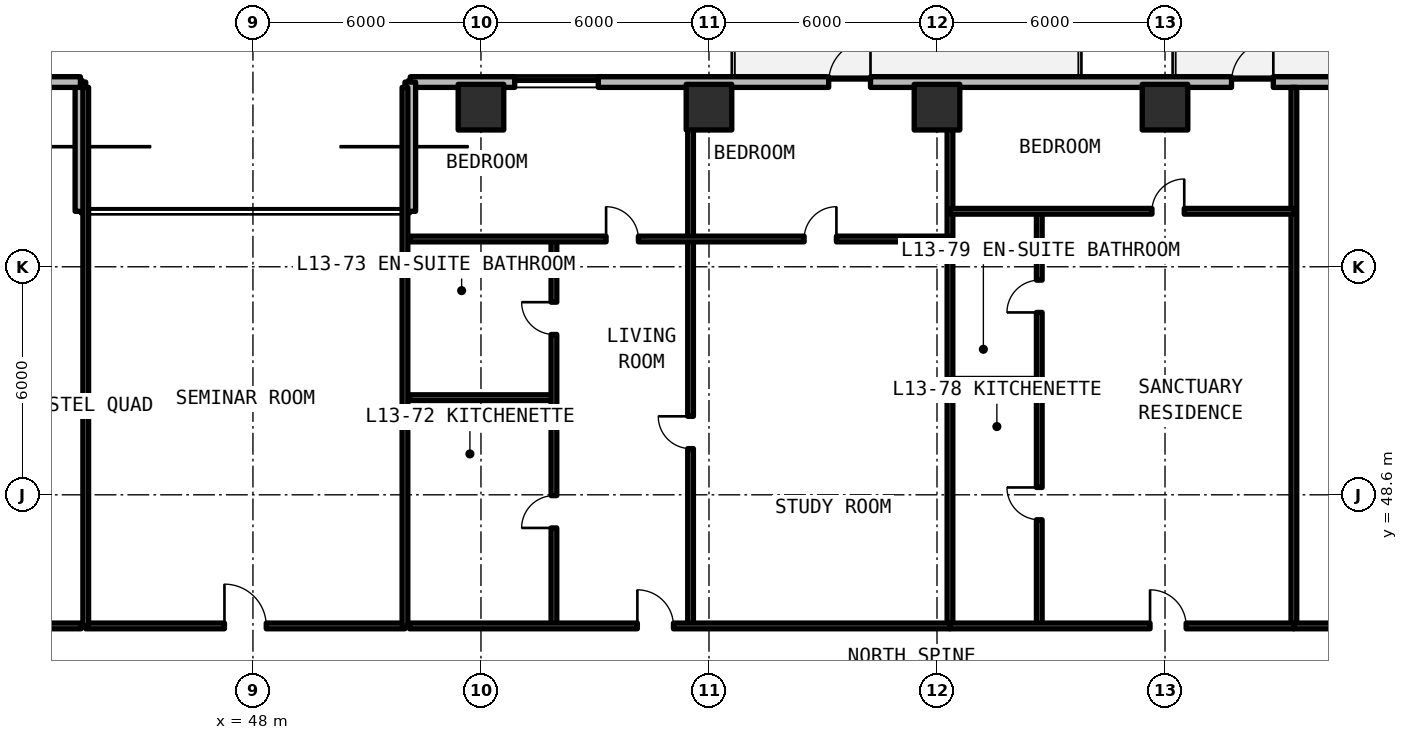
"""IFC4 building model, lengths in metres.
Left out: names, types, materials, properties, quantities, classifications, styles, units other than length and angle.
Written with IfcOpenShell. Run it as: python <this file> out.ifc"""

import sys

from ifc_helpers import new_model, si_unit, direction, frame, frame_2d, origin, origin_2d, place, context, subcontext, project, spatial, rectangle, extrude, element, fill, save


model = new_model("IFC4")
c1 = context("Model", 3, precision=1e-05, world=origin(), true_north=direction((0.0, 1.0)))
c2 = subcontext(c1, "Body", "Model", "MODEL_VIEW")
j1 = project(units=[si_unit("LENGTHUNIT", "METRE"), si_unit("PLANEANGLEUNIT", "RADIAN")], contexts=[c1])
p1 = place(None, origin())
s1 = spatial("IfcSite", under=j1, at=p1, CompositionType="ELEMENT")
p2 = place(p1, origin())
s2 = spatial("IfcBuilding", under=s1, at=p2, CompositionType="ELEMENT")
p3 = place(p2, frame((0.0, 0.0, 48.84)))
s3 = spatial("IfcBuildingStorey", under=s2, at=p3, CompositionType="ELEMENT", Elevation=48.84)
for number, where, z_axis, x_axis in (
    (1, (54.0, 58.8, 0.0), (0.0, 0.0, 1.0), (1.0, 0.0, 0.0)),
    (2, (60.0, 58.8, 0.0), (0.0, 0.0, 1.0), (1.0, 0.0, 0.0)),
    (3, (66.0, 58.8, 0.0), (0.0, 0.0, 1.0), (1.0, 0.0, 0.0)),
    (4, (72.0, 58.8, 0.0), (0.0, 0.0, 1.0), (1.0, 0.0, 0.0)),
):
    element("IfcColumn", number, at=place(p3, frame(where, z_axis=z_axis, x_axis=x_axis)), inside=s3, PredefinedType="COLUMN", context=c2, shape_type="SweptSolid", body=[
        extrude(rectangle(XDim=1.2, YDim=1.2, at=origin_2d()), origin(), (0.0, 0.0, 1.0), 3.3),
    ])
p4 = place(p3, frame((96.542, 59.46, 0.0), z_axis=(0.0, 0.0, 1.0), x_axis=(-1.0, 0.0, 0.0)))
e5 = element("IfcWall", 5, at=p4, inside=s3, PredefinedType="SOLIDWALL", context=c2, shape_type="SweptSolid", body=[
    extrude(rectangle(XDim=44.402, YDim=0.28, at=frame_2d((22.201, 0.0))), origin(), (0.0, 0.0, 1.0), 3.08),
])
p5 = place(p4, frame((32.292, 0.0, 0.0)))
e6 = element("IfcOpeningElement", 6, at=p5, cuts=e5, PredefinedType="OPENING", context=c2, shape_type="SweptSolid", body=[
    extrude(rectangle(XDim=1.1, YDim=2.15, at=frame_2d((0.55, 1.075))), frame((0.0, 0.15, 0.0), z_axis=(0.0, -1.0, 0.0), x_axis=(1.0, 0.0, 0.0)), (0.0, 0.0, 1.0), 0.3),
])
p6 = place(p4, frame((21.692, 0.0, 0.0)))
e7 = element("IfcOpeningElement", 7, at=p6, cuts=e5, PredefinedType="OPENING", context=c2, shape_type="SweptSolid", body=[
    extrude(rectangle(XDim=1.1, YDim=2.15, at=frame_2d((0.55, 1.075))), frame((0.0, 0.15, 0.0), z_axis=(0.0, -1.0, 0.0), x_axis=(1.0, 0.0, 0.0)), (0.0, 0.0, 1.0), 0.3),
])
p7 = place(p4, frame((9.792, 0.0, 0.0)))
e8 = element("IfcOpeningElement", 8, at=p7, cuts=e5, PredefinedType="OPENING", context=c2, shape_type="SweptSolid", body=[
    extrude(rectangle(XDim=1.1, YDim=2.15, at=frame_2d((0.55, 1.075))), frame((0.0, 0.15, 0.0), z_axis=(0.0, -1.0, 0.0), x_axis=(1.0, 0.0, 0.0)), (0.0, 0.0, 1.0), 0.3),
])
p8 = place(p4, frame((39.455, 0.0, 0.78)))
e9 = element("IfcOpeningElement", 9, at=p8, cuts=e5, PredefinedType="OPENING", context=c2, shape_type="SweptSolid", body=[
    extrude(rectangle(XDim=2.2, YDim=1.66, at=frame_2d((1.1, 0.83))), frame((0.0, 0.15, 0.0), z_axis=(0.0, -1.0, 0.0), x_axis=(1.0, 0.0, 0.0)), (0.0, 0.0, 1.0), 0.3),
])
p9 = place(p4, frame((7.432, 0.0, 0.78)))
e10 = element("IfcOpeningElement", 10, at=p9, cuts=e5, PredefinedType="OPENING", context=c2, shape_type="SweptSolid", body=[
    extrude(rectangle(XDim=0.85, YDim=1.65, at=frame_2d((0.425, 0.825))), frame((0.0, 0.15, 0.0), z_axis=(0.0, -1.0, 0.0), x_axis=(1.0, 0.0, 0.0)), (0.0, 0.0, 1.0), 0.3),
])
p10 = place(p4, frame((1.292, 0.0, 0.78)))
e11 = element("IfcOpeningElement", 11, at=p10, cuts=e5, PredefinedType="OPENING", context=c2, shape_type="SweptSolid", body=[
    extrude(rectangle(XDim=2.2, YDim=1.66, at=frame_2d((1.1, 0.83))), frame((0.0, 0.15, 0.0), z_axis=(0.0, -1.0, 0.0), x_axis=(1.0, 0.0, 0.0)), (0.0, 0.0, 1.0), 0.3),
])
for number, where, z_axis, x_axis in (
    (12, (52.14, 59.46, 0.0), (0.0, 0.0, 1.0), (0.0, -1.0, 0.0)),
    (13, (43.46, 56.06, 0.0), (0.0, 0.0, 1.0), (0.0, 1.0, 0.0)),
):
    element("IfcWall", number, at=place(p3, frame(where, z_axis=z_axis, x_axis=x_axis)), inside=s3, PredefinedType="SOLIDWALL", context=c2, shape_type="SweptSolid", body=[
        extrude(rectangle(XDim=3.4, YDim=0.28, at=frame_2d((1.7, 0.0))), origin(), (0.0, 0.0, 1.0), 3.08),
    ])
p11 = place(p3, frame((43.46, 59.46, 0.0), z_axis=(0.0, 0.0, 1.0), x_axis=(-1.0, 0.0, 0.0)))
e14 = element("IfcWall", 14, at=p11, inside=s3, PredefinedType="SOLIDWALL", context=c2, shape_type="SweptSolid", body=[
    extrude(rectangle(XDim=22.602, YDim=0.28, at=frame_2d((11.301, 0.0))), origin(), (0.0, 0.0, 1.0), 3.08),
])
p12 = place(p11, frame((15.26, 0.0, 0.0)))
e15 = element("IfcOpeningElement", 15, at=p12, cuts=e14, PredefinedType="OPENING", context=c2, shape_type="SweptSolid", body=[
    extrude(rectangle(XDim=1.1, YDim=2.15, at=frame_2d((0.55, 1.075))), frame((0.0, 0.15, 0.0), z_axis=(0.0, -1.0, 0.0), x_axis=(1.0, 0.0, 0.0)), (0.0, 0.0, 1.0), 0.3),
])
p13 = place(p11, frame((20.321, 0.0, 0.78)))
e16 = element("IfcOpeningElement", 16, at=p13, cuts=e14, PredefinedType="OPENING", context=c2, shape_type="SweptSolid", body=[
    extrude(rectangle(XDim=1.4, YDim=1.65, at=frame_2d((0.7, 0.825))), frame((0.0, 0.15, 0.0), z_axis=(0.0, -1.0, 0.0), x_axis=(1.0, 0.0, 0.0)), (0.0, 0.0, 1.0), 0.3),
])
p14 = place(p11, frame((5.793, 0.0, 0.78)))
e17 = element("IfcOpeningElement", 17, at=p14, cuts=e14, PredefinedType="OPENING", context=c2, shape_type="SweptSolid", body=[
    extrude(rectangle(XDim=0.85, YDim=1.65, at=frame_2d((0.425, 0.825))), frame((0.0, 0.15, 0.0), z_axis=(0.0, -1.0, 0.0), x_axis=(1.0, 0.0, 0.0)), (0.0, 0.0, 1.0), 0.3),
])
p15 = place(p11, frame((3.733, 0.0, 0.78)))
e18 = element("IfcOpeningElement", 18, at=p15, cuts=e14, PredefinedType="OPENING", context=c2, shape_type="SweptSolid", body=[
    extrude(rectangle(XDim=0.85, YDim=1.65, at=frame_2d((0.425, 0.825))), frame((0.0, 0.15, 0.0), z_axis=(0.0, -1.0, 0.0), x_axis=(1.0, 0.0, 0.0)), (0.0, 0.0, 1.0), 0.3),
])
p16 = place(p11, frame((2.065, 0.0, 0.78)))
e19 = element("IfcOpeningElement", 19, at=p16, cuts=e14, PredefinedType="OPENING", context=c2, shape_type="SweptSolid", body=[
    extrude(rectangle(XDim=0.85, YDim=1.65, at=frame_2d((0.425, 0.825))), frame((0.0, 0.15, 0.0), z_axis=(0.0, -1.0, 0.0), x_axis=(1.0, 0.0, 0.0)), (0.0, 0.0, 1.0), 0.3),
])
p17 = place(p3, frame((43.6, 45.15, 0.0), z_axis=(0.0, 0.0, 1.0), x_axis=(1.0, 0.0, 0.0)))
e20 = element("IfcWall", 20, at=p17, inside=s3, PredefinedType="SOLIDWALL", context=c2, shape_type="SweptSolid", body=[
    extrude(rectangle(XDim=8.4, YDim=0.15, at=frame_2d((4.2, 0.0))), origin(), (0.0, 0.0, 1.0), 2.35),
])
p18 = place(p17, frame((3.65, 0.0, 0.0)))
e21 = element("IfcOpeningElement", 21, at=p18, cuts=e20, PredefinedType="OPENING", context=c2, shape_type="SweptSolid", body=[
    extrude(rectangle(XDim=1.1, YDim=2.15, at=frame_2d((0.55, 1.075))), frame((0.0, 0.085, 0.0), z_axis=(0.0, -1.0, 0.0), x_axis=(1.0, 0.0, 0.0)), (0.0, 0.0, 1.0), 0.17),
])
for number, where, z_axis, x_axis in (
    (22, (43.6, 45.15, 0.0), (0.0, 0.0, 1.0), (0.0, 1.0, 0.0)),
    (23, (52.0, 45.15, 0.0), (0.0, 0.0, 1.0), (0.0, 1.0, 0.0)),
):
    element("IfcWall", number, at=place(p3, frame(where, z_axis=z_axis, x_axis=x_axis)), inside=s3, PredefinedType="SOLIDWALL", context=c2, shape_type="SweptSolid", body=[
        extrude(rectangle(XDim=14.17, YDim=0.15, at=frame_2d((7.085, 0.0))), origin(), (0.0, 0.0, 1.0), 2.35),
    ])
p19 = place(p3, frame((38.504, 45.15, 0.0), z_axis=(0.0, 0.0, 1.0), x_axis=(1.0, 0.0, 0.0)))
e24 = element("IfcWall", 24, at=p19, inside=s3, PredefinedType="SOLIDWALL", context=c2, shape_type="SweptSolid", body=[
    extrude(rectangle(XDim=4.976, YDim=0.15, at=frame_2d((2.488, 0.0))), origin(), (0.0, 0.0, 1.0), 2.35),
])
p20 = place(p19, frame((2.841, 0.0, 0.0)))
e25 = element("IfcOpeningElement", 25, at=p20, cuts=e24, PredefinedType="OPENING", context=c2, shape_type="SweptSolid", body=[
    extrude(rectangle(XDim=0.95, YDim=2.15, at=frame_2d((0.475, 1.075))), frame((0.0, 0.085, 0.0), z_axis=(0.0, -1.0, 0.0), x_axis=(1.0, 0.0, 0.0)), (0.0, 0.0, 1.0), 0.17),
])
p21 = place(p3, frame((66.341, 45.15, 0.0), z_axis=(0.0, 0.0, 1.0), x_axis=(0.0, 1.0, 0.0)))
e26 = element("IfcWall", 26, at=p21, inside=s3, PredefinedType="SOLIDWALL", context=c2, shape_type="SweptSolid", body=[
    extrude(rectangle(XDim=14.17, YDim=0.15, at=frame_2d((7.085, 0.0))), origin(), (0.0, 0.0, 1.0), 2.35),
])
p22 = place(p3, frame((59.515, 45.15, 0.0), z_axis=(0.0, 0.0, 1.0), x_axis=(0.0, 1.0, 0.0)))
e27 = element("IfcWall", 27, at=p22, inside=s3, PredefinedType="PARTITIONING", context=c2, shape_type="SweptSolid", body=[
    extrude(rectangle(XDim=10.181, YDim=0.15, at=frame_2d((5.09, 0.0))), origin(), (0.0, 0.0, 1.0), 2.35),
])
p23 = place(p22, frame((4.666, 0.0, 0.0)))
e28 = element("IfcOpeningElement", 28, at=p23, cuts=e27, PredefinedType="OPENING", context=c2, shape_type="SweptSolid", body=[
    extrude(rectangle(XDim=0.85, YDim=2.1, at=frame_2d((0.425, 1.05))), frame((0.0, 0.085, 0.0), z_axis=(0.0, -1.0, 0.0), x_axis=(1.0, 0.0, 0.0)), (0.0, 0.0, 1.0), 0.17),
])
p24 = place(p3, frame((52.12, 51.157, 0.0), z_axis=(0.0, 0.0, 1.0), x_axis=(1.0, 0.0, 0.0)))
e29 = element("IfcWall", 29, at=p24, inside=s3, PredefinedType="PARTITIONING", context=c2, shape_type="SweptSolid", body=[
    extrude(rectangle(XDim=3.8, YDim=0.15, at=frame_2d((1.9, 0.0))), origin(), (0.0, 0.0, 1.0), 2.35),
])
p25 = place(p3, frame((55.92, 45.15, 0.0), z_axis=(0.0, 0.0, 1.0), x_axis=(0.0, 1.0, 0.0)))
e30 = element("IfcWall", 30, at=p25, inside=s3, PredefinedType="PARTITIONING", context=c2, shape_type="SweptSolid", body=[
    extrude(rectangle(XDim=10.181, YDim=0.15, at=frame_2d((5.09, 0.0))), origin(), (0.0, 0.0, 1.0), 2.35),
])
p26 = place(p25, frame((2.578, 0.0, 0.0)))
e31 = element("IfcOpeningElement", 31, at=p26, cuts=e30, PredefinedType="OPENING", context=c2, shape_type="SweptSolid", body=[
    extrude(rectangle(XDim=0.85, YDim=2.1, at=frame_2d((0.425, 1.05))), frame((0.0, 0.085, 0.0), z_axis=(0.0, -1.0, 0.0), x_axis=(1.0, 0.0, 0.0)), (0.0, 0.0, 1.0), 0.17),
])
p27 = place(p25, frame((7.669, 0.0, 0.0)))
e32 = element("IfcOpeningElement", 32, at=p27, cuts=e30, PredefinedType="OPENING", context=c2, shape_type="SweptSolid", body=[
    extrude(rectangle(XDim=0.85, YDim=2.1, at=frame_2d((0.425, 1.05))), frame((0.0, 0.085, 0.0), z_axis=(0.0, -1.0, 0.0), x_axis=(1.0, 0.0, 0.0)), (0.0, 0.0, 1.0), 0.17),
])
p28 = place(p3, frame((59.515, 55.331, 0.0), z_axis=(0.0, 0.0, 1.0), x_axis=(0.0, 1.0, 0.0)))
e33 = element("IfcWall", 33, at=p28, inside=s3, PredefinedType="PARTITIONING", context=c2, shape_type="SweptSolid", body=[
    extrude(rectangle(XDim=3.989, YDim=0.15, at=frame_2d((1.995, 0.0))), origin(), (0.0, 0.0, 1.0), 2.35),
])
p29 = place(p3, frame((52.12, 55.331, 0.0), z_axis=(0.0, 0.0, 1.0), x_axis=(1.0, 0.0, 0.0)))
e34 = element("IfcWall", 34, at=p29, inside=s3, PredefinedType="PARTITIONING", context=c2, shape_type="SweptSolid", body=[
    extrude(rectangle(XDim=14.221, YDim=0.15, at=frame_2d((7.111, 0.0))), origin(), (0.0, 0.0, 1.0), 2.35),
])
p30 = place(p29, frame((5.173, 0.0, 0.0)))
e35 = element("IfcOpeningElement", 35, at=p30, cuts=e34, PredefinedType="OPENING", context=c2, shape_type="SweptSolid", body=[
    extrude(rectangle(XDim=0.85, YDim=2.1, at=frame_2d((0.425, 1.05))), frame((0.0, 0.085, 0.0), z_axis=(0.0, -1.0, 0.0), x_axis=(1.0, 0.0, 0.0)), (0.0, 0.0, 1.0), 0.17),
])
p31 = place(p29, frame((10.383, 0.0, 0.0)))
e36 = element("IfcOpeningElement", 36, at=p31, cuts=e34, PredefinedType="OPENING", context=c2, shape_type="SweptSolid", body=[
    extrude(rectangle(XDim=0.85, YDim=2.1, at=frame_2d((0.425, 1.05))), frame((0.0, 0.085, 0.0), z_axis=(0.0, -1.0, 0.0), x_axis=(1.0, 0.0, 0.0)), (0.0, 0.0, 1.0), 0.17),
])
p32 = place(p3, frame((52.12, 45.15, 0.0), z_axis=(0.0, 0.0, 1.0), x_axis=(1.0, 0.0, 0.0)))
e37 = element("IfcWall", 37, at=p32, inside=s3, PredefinedType="SOLIDWALL", context=c2, shape_type="SweptSolid", body=[
    extrude(rectangle(XDim=14.221, YDim=0.15, at=frame_2d((7.111, 0.0))), origin(), (0.0, 0.0, 1.0), 2.35),
])
p33 = place(p32, frame((5.995, 0.0, 0.0)))
e38 = element("IfcOpeningElement", 38, at=p33, cuts=e37, PredefinedType="OPENING", context=c2, shape_type="SweptSolid", body=[
    extrude(rectangle(XDim=0.95, YDim=2.15, at=frame_2d((0.475, 1.075))), frame((0.0, 0.085, 0.0), z_axis=(0.0, -1.0, 0.0), x_axis=(1.0, 0.0, 0.0)), (0.0, 0.0, 1.0), 0.17),
])
p34 = place(p3, frame((75.391, 45.15, 0.0), z_axis=(0.0, 0.0, 1.0), x_axis=(0.0, 1.0, 0.0)))
e39 = element("IfcWall", 39, at=p34, inside=s3, PredefinedType="SOLIDWALL", context=c2, shape_type="SweptSolid", body=[
    extrude(rectangle(XDim=14.17, YDim=0.15, at=frame_2d((7.085, 0.0))), origin(), (0.0, 0.0, 1.0), 2.35),
])
p35 = place(p3, frame((66.341, 51.587, 0.0), z_axis=(0.0, 0.0, 1.0), x_axis=(1.0, 0.0, 0.0)))
e40 = element("IfcWall", 40, at=p35, inside=s3, PredefinedType="PARTITIONING", context=c2, shape_type="SweptSolid", body=[
    extrude(rectangle(XDim=2.35, YDim=0.15, at=frame_2d((1.175, 0.0))), origin(), (0.0, 0.0, 1.0), 2.35),
])
p36 = place(p3, frame((68.691, 45.15, 0.0), z_axis=(0.0, 0.0, 1.0), x_axis=(0.0, 1.0, 0.0)))
e41 = element("IfcWall", 41, at=p36, inside=s3, PredefinedType="PARTITIONING", context=c2, shape_type="SweptSolid", body=[
    extrude(rectangle(XDim=10.91, YDim=0.15, at=frame_2d((5.455, 0.0))), origin(), (0.0, 0.0, 1.0), 2.35),
])
p37 = place(p36, frame((2.794, 0.0, 0.0)))
e42 = element("IfcOpeningElement", 42, at=p37, cuts=e41, PredefinedType="OPENING", context=c2, shape_type="SweptSolid", body=[
    extrude(rectangle(XDim=0.85, YDim=2.1, at=frame_2d((0.425, 1.05))), frame((0.0, 0.085, 0.0), z_axis=(0.0, -1.0, 0.0), x_axis=(1.0, 0.0, 0.0)), (0.0, 0.0, 1.0), 0.17),
])
p38 = place(p36, frame((8.249, 0.0, 0.0)))
e43 = element("IfcOpeningElement", 43, at=p38, cuts=e41, PredefinedType="OPENING", context=c2, shape_type="SweptSolid", body=[
    extrude(rectangle(XDim=0.85, YDim=2.1, at=frame_2d((0.425, 1.05))), frame((0.0, 0.085, 0.0), z_axis=(0.0, -1.0, 0.0), x_axis=(1.0, 0.0, 0.0)), (0.0, 0.0, 1.0), 0.17),
])
p39 = place(p3, frame((66.341, 56.06, 0.0), z_axis=(0.0, 0.0, 1.0), x_axis=(1.0, 0.0, 0.0)))
e44 = element("IfcWall", 44, at=p39, inside=s3, PredefinedType="PARTITIONING", context=c2, shape_type="SweptSolid", body=[
    extrude(rectangle(XDim=9.05, YDim=0.15, at=frame_2d((4.525, 0.0))), origin(), (0.0, 0.0, 1.0), 2.35),
])
p40 = place(p39, frame((5.315, 0.0, 0.0)))
e45 = element("IfcOpeningElement", 45, at=p40, cuts=e44, PredefinedType="OPENING", context=c2, shape_type="SweptSolid", body=[
    extrude(rectangle(XDim=0.85, YDim=2.1, at=frame_2d((0.425, 1.05))), frame((0.0, 0.085, 0.0), z_axis=(0.0, -1.0, 0.0), x_axis=(1.0, 0.0, 0.0)), (0.0, 0.0, 1.0), 0.17),
])
p41 = place(p3, frame((66.341, 45.15, 0.0), z_axis=(0.0, 0.0, 1.0), x_axis=(1.0, 0.0, 0.0)))
e46 = element("IfcWall", 46, at=p41, inside=s3, PredefinedType="SOLIDWALL", context=c2, shape_type="SweptSolid", body=[
    extrude(rectangle(XDim=9.05, YDim=0.15, at=frame_2d((4.525, 0.0))), origin(), (0.0, 0.0, 1.0), 2.35),
])
p42 = place(p41, frame((5.265, 0.0, 0.0)))
e47 = element("IfcOpeningElement", 47, at=p42, cuts=e46, PredefinedType="OPENING", context=c2, shape_type="SweptSolid", body=[
    extrude(rectangle(XDim=0.95, YDim=2.15, at=frame_2d((0.475, 1.075))), frame((0.0, 0.085, 0.0), z_axis=(0.0, -1.0, 0.0), x_axis=(1.0, 0.0, 0.0)), (0.0, 0.0, 1.0), 0.17),
])
p43 = place(p3, frame((75.391, 45.15, 0.0), z_axis=(0.0, 0.0, 1.0), x_axis=(1.0, 0.0, 0.0)))
e48 = element("IfcWall", 48, at=p43, inside=s3, PredefinedType="SOLIDWALL", context=c2, shape_type="SweptSolid", body=[
    extrude(rectangle(XDim=11.959, YDim=0.15, at=frame_2d((5.979, 0.0))), origin(), (0.0, 0.0, 1.0), 2.35),
])
p44 = place(p43, frame((5.429, 0.0, 0.0)))
e49 = element("IfcOpeningElement", 49, at=p44, cuts=e48, PredefinedType="OPENING", context=c2, shape_type="SweptSolid", body=[
    extrude(rectangle(XDim=1.1, YDim=2.15, at=frame_2d((0.55, 1.075))), frame((0.0, 0.085, 0.0), z_axis=(0.0, -1.0, 0.0), x_axis=(1.0, 0.0, 0.0)), (0.0, 0.0, 1.0), 0.17),
])
p45 = place(p5, frame((1.1, 0.0, 0.0), z_axis=(0.0, 0.0, 1.0), x_axis=(-1.0, 0.0, 0.0)))
e50 = element("IfcDoor", 50, at=p45, inside=s3, OperationType="SINGLE_SWING_RIGHT", PredefinedType="DOOR", context=c2, shape_type="SweptSolid", body=[
    extrude(rectangle(XDim=1.1, YDim=2.15, at=frame_2d((0.55, 1.075))), frame((0.0, 0.025, 0.0), z_axis=(0.0, -1.0, 0.0), x_axis=(1.0, 0.0, 0.0)), (0.0, 0.0, 1.0), 0.05),
])
fill(e6, e50)
p46 = place(p6, frame((1.1, 0.0, 0.0), z_axis=(0.0, 0.0, 1.0), x_axis=(-1.0, 0.0, 0.0)))
e51 = element("IfcDoor", 51, at=p46, inside=s3, OperationType="SINGLE_SWING_LEFT", PredefinedType="DOOR", context=c2, shape_type="SweptSolid", body=[
    extrude(rectangle(XDim=1.1, YDim=2.15, at=frame_2d((0.55, 1.075))), frame((0.0, 0.025, 0.0), z_axis=(0.0, -1.0, 0.0), x_axis=(1.0, 0.0, 0.0)), (0.0, 0.0, 1.0), 0.05),
])
fill(e7, e51)
p47 = place(p8, origin())
e52 = element("IfcWindow", 52, at=p47, inside=s3, PartitioningType="SINGLE_PANEL", PredefinedType="WINDOW", context=c2, shape_type="SweptSolid", body=[
    extrude(rectangle(XDim=2.2, YDim=1.66, at=frame_2d((1.1, 0.83))), frame((0.0, 0.03, 0.0), z_axis=(0.0, -1.0, 0.0), x_axis=(1.0, 0.0, 0.0)), (0.0, 0.0, 1.0), 0.06),
])
fill(e9, e52)
p48 = place(p18, origin())
e53 = element("IfcDoor", 53, at=p48, inside=s3, OperationType="SINGLE_SWING_LEFT", PredefinedType="DOOR", context=c2, shape_type="SweptSolid", body=[
    extrude(rectangle(XDim=1.1, YDim=2.15, at=frame_2d((0.55, 1.075))), frame((0.0, 0.025, 0.0), z_axis=(0.0, -1.0, 0.0), x_axis=(1.0, 0.0, 0.0)), (0.0, 0.0, 1.0), 0.05),
])
fill(e21, e53)
p49 = place(p23, origin())
e54 = element("IfcDoor", 54, at=p49, inside=s3, OperationType="SINGLE_SWING_RIGHT", PredefinedType="DOOR", context=c2, shape_type="SweptSolid", body=[
    extrude(rectangle(XDim=0.85, YDim=2.1, at=frame_2d((0.425, 1.05))), frame((0.0, 0.025, 0.0), z_axis=(0.0, -1.0, 0.0), x_axis=(1.0, 0.0, 0.0)), (0.0, 0.0, 1.0), 0.05),
])
fill(e28, e54)
p50 = place(p26, origin())
e55 = element("IfcDoor", 55, at=p50, inside=s3, OperationType="SINGLE_SWING_LEFT", PredefinedType="DOOR", context=c2, shape_type="SweptSolid", body=[
    extrude(rectangle(XDim=0.85, YDim=2.1, at=frame_2d((0.425, 1.05))), frame((0.0, 0.025, 0.0), z_axis=(0.0, -1.0, 0.0), x_axis=(1.0, 0.0, 0.0)), (0.0, 0.0, 1.0), 0.05),
])
fill(e31, e55)
p51 = place(p27, origin())
e56 = element("IfcDoor", 56, at=p51, inside=s3, OperationType="SINGLE_SWING_RIGHT", PredefinedType="DOOR", context=c2, shape_type="SweptSolid", body=[
    extrude(rectangle(XDim=0.85, YDim=2.1, at=frame_2d((0.425, 1.05))), frame((0.0, 0.025, 0.0), z_axis=(0.0, -1.0, 0.0), x_axis=(1.0, 0.0, 0.0)), (0.0, 0.0, 1.0), 0.05),
])
fill(e32, e56)
p52 = place(p30, origin())
e57 = element("IfcDoor", 57, at=p52, inside=s3, OperationType="SINGLE_SWING_LEFT", PredefinedType="DOOR", context=c2, shape_type="SweptSolid", body=[
    extrude(rectangle(XDim=0.85, YDim=2.1, at=frame_2d((0.425, 1.05))), frame((0.0, 0.025, 0.0), z_axis=(0.0, -1.0, 0.0), x_axis=(1.0, 0.0, 0.0)), (0.0, 0.0, 1.0), 0.05),
])
fill(e35, e57)
p53 = place(p31, origin())
e58 = element("IfcDoor", 58, at=p53, inside=s3, OperationType="SINGLE_SWING_RIGHT", PredefinedType="DOOR", context=c2, shape_type="SweptSolid", body=[
    extrude(rectangle(XDim=0.85, YDim=2.1, at=frame_2d((0.425, 1.05))), frame((0.0, 0.025, 0.0), z_axis=(0.0, -1.0, 0.0), x_axis=(1.0, 0.0, 0.0)), (0.0, 0.0, 1.0), 0.05),
])
fill(e36, e58)
p54 = place(p33, origin())
e59 = element("IfcDoor", 59, at=p54, inside=s3, OperationType="SINGLE_SWING_LEFT", PredefinedType="DOOR", context=c2, shape_type="SweptSolid", body=[
    extrude(rectangle(XDim=0.95, YDim=2.15, at=frame_2d((0.475, 1.075))), frame((0.0, 0.025, 0.0), z_axis=(0.0, -1.0, 0.0), x_axis=(1.0, 0.0, 0.0)), (0.0, 0.0, 1.0), 0.05),
])
fill(e38, e59)
p55 = place(p37, origin())
e60 = element("IfcDoor", 60, at=p55, inside=s3, OperationType="SINGLE_SWING_RIGHT", PredefinedType="DOOR", context=c2, shape_type="SweptSolid", body=[
    extrude(rectangle(XDim=0.85, YDim=2.1, at=frame_2d((0.425, 1.05))), frame((0.0, 0.025, 0.0), z_axis=(0.0, -1.0, 0.0), x_axis=(1.0, 0.0, 0.0)), (0.0, 0.0, 1.0), 0.05),
])
fill(e42, e60)
p56 = place(p38, origin())
e61 = element("IfcDoor", 61, at=p56, inside=s3, OperationType="SINGLE_SWING_LEFT", PredefinedType="DOOR", context=c2, shape_type="SweptSolid", body=[
    extrude(rectangle(XDim=0.85, YDim=2.1, at=frame_2d((0.425, 1.05))), frame((0.0, 0.025, 0.0), z_axis=(0.0, -1.0, 0.0), x_axis=(1.0, 0.0, 0.0)), (0.0, 0.0, 1.0), 0.05),
])
fill(e43, e61)
p57 = place(p40, origin())
e62 = element("IfcDoor", 62, at=p57, inside=s3, OperationType="SINGLE_SWING_RIGHT", PredefinedType="DOOR", context=c2, shape_type="SweptSolid", body=[
    extrude(rectangle(XDim=0.85, YDim=2.1, at=frame_2d((0.425, 1.05))), frame((0.0, 0.025, 0.0), z_axis=(0.0, -1.0, 0.0), x_axis=(1.0, 0.0, 0.0)), (0.0, 0.0, 1.0), 0.05),
])
fill(e45, e62)
p58 = place(p42, origin())
e63 = element("IfcDoor", 63, at=p58, inside=s3, OperationType="SINGLE_SWING_LEFT", PredefinedType="DOOR", context=c2, shape_type="SweptSolid", body=[
    extrude(rectangle(XDim=0.95, YDim=2.15, at=frame_2d((0.475, 1.075))), frame((0.0, 0.025, 0.0), z_axis=(0.0, -1.0, 0.0), x_axis=(1.0, 0.0, 0.0)), (0.0, 0.0, 1.0), 0.05),
])
fill(e47, e63)
save(model, sys.argv[1])
